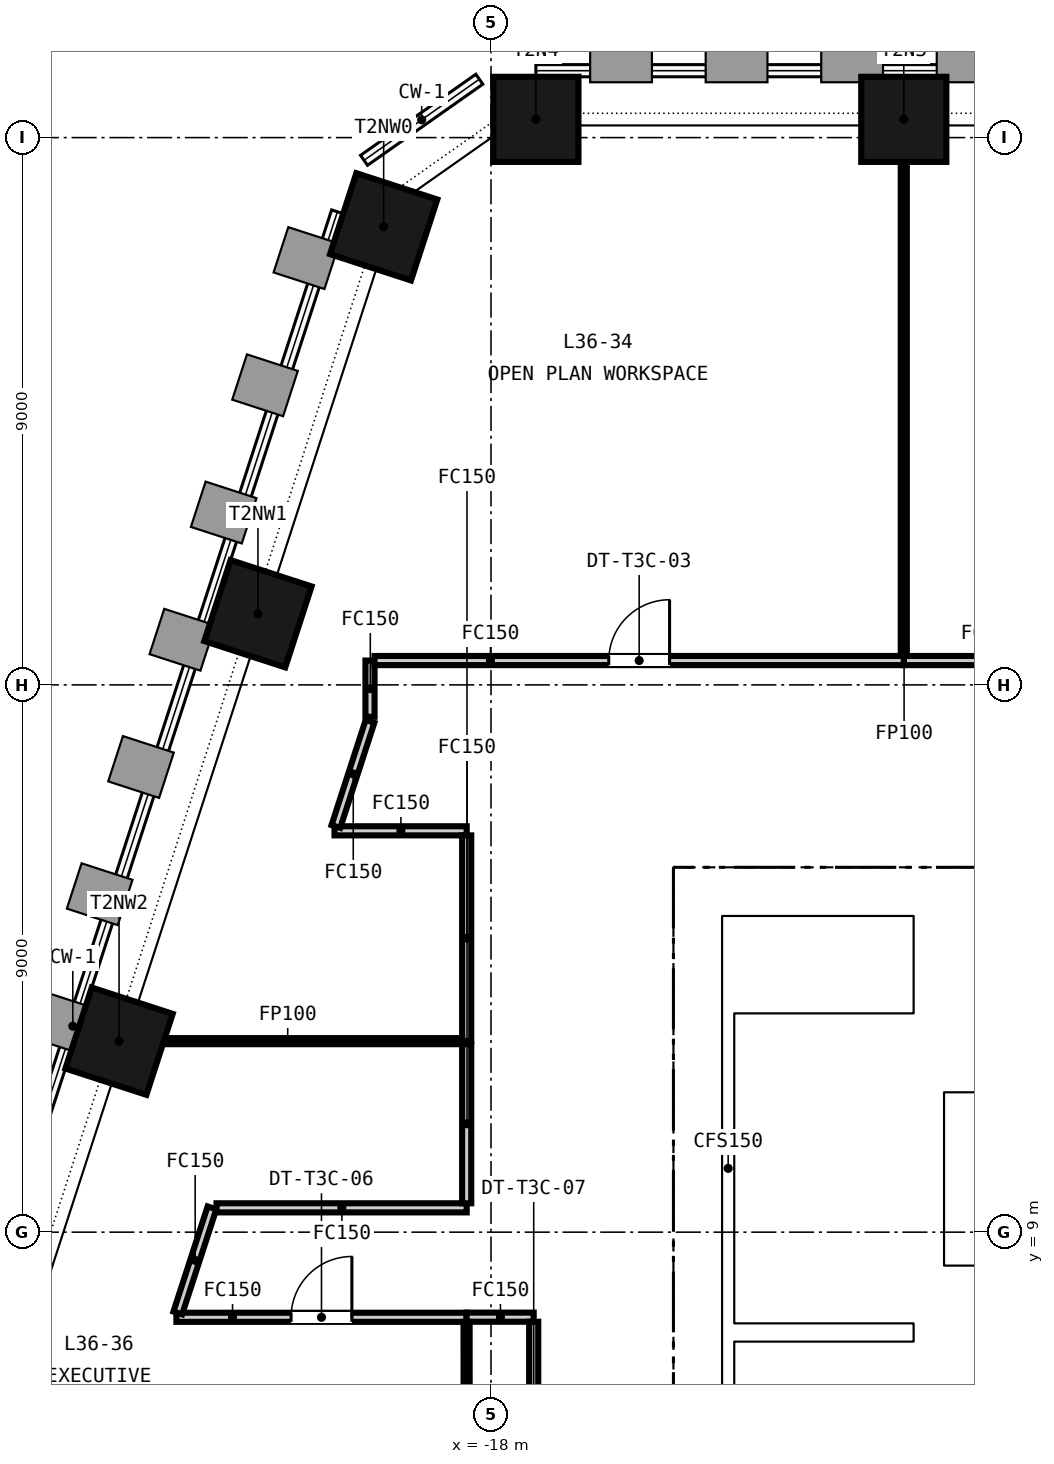
"""IFC4 building model, lengths in metres.
Left out: names, types, materials, properties, quantities, classifications, styles, units other than length and angle.
Written with IfcOpenShell. Run it as: python <this file> out.ifc"""

import sys

from ifc_helpers import new_model, si_unit, direction, frame, frame_2d, origin, origin_2d, place, context, subcontext, project, spatial, rectangle, extrude, element, fill, save


model = new_model("IFC4")
c1 = context("Model", 3, precision=1e-05, world=origin(), true_north=direction((0.0, 1.0)))
c2 = subcontext(c1, "Body", "Model", "MODEL_VIEW")
j1 = project(units=[si_unit("LENGTHUNIT", "METRE"), si_unit("PLANEANGLEUNIT", "RADIAN")], contexts=[c1])
p1 = place(None, origin())
s1 = spatial("IfcSite", under=j1, at=p1, CompositionType="ELEMENT")
p2 = place(p1, origin())
s2 = spatial("IfcBuilding", under=s1, at=p2, CompositionType="ELEMENT")
p3 = place(p2, frame((0.0, 0.0, 148.05)))
s3 = spatial("IfcBuildingStorey", under=s2, at=p3, CompositionType="ELEMENT", Elevation=148.05)
p4 = place(p3, frame((-15.0, 14.6, -0.15), z_axis=(0.0, 0.0, 1.0), x_axis=(1.0, 0.0, 0.0)))
e1 = element("IfcWall", 1, at=p4, inside=s3, PredefinedType="SOLIDWALL", context=c2, shape_type="SweptSolid", body=[
    extrude(rectangle(XDim=30.0, YDim=0.8, at=frame_2d((15.0, 0.0))), origin(), (0.0, 0.0, 1.0), 3.65),
])
p5 = place(p4, frame((9.25, 0.0, 0.15)))
e2 = element("IfcOpeningElement", 2, at=p5, cuts=e1, PredefinedType="OPENING", context=c2, shape_type="SweptSolid", body=[
    extrude(rectangle(XDim=1.5, YDim=2.1, at=frame_2d((0.75, 1.05))), frame((0.0, 0.41, 0.0), z_axis=(0.0, -1.0, 0.0), x_axis=(1.0, 0.0, 0.0)), (0.0, 0.0, 1.0), 0.82),
])
p6 = place(p4, frame((19.4, 0.0, 0.15)))
e3 = element("IfcOpeningElement", 3, at=p6, cuts=e1, PredefinedType="OPENING", context=c2, shape_type="SweptSolid", body=[
    extrude(rectangle(XDim=1.5, YDim=2.1, at=frame_2d((0.75, 1.05))), frame((0.0, 0.41, 0.0), z_axis=(0.0, -1.0, 0.0), x_axis=(1.0, 0.0, 0.0)), (0.0, 0.0, 1.0), 0.82),
])
p7 = place(p4, frame((1.5, 0.0, 0.15)))
e4 = element("IfcOpeningElement", 4, at=p7, cuts=e1, PredefinedType="OPENING", context=c2, shape_type="SweptSolid", body=[
    extrude(rectangle(XDim=1.2, YDim=2.1, at=frame_2d((0.6, 1.05))), frame((0.0, 0.41, 0.0), z_axis=(0.0, -1.0, 0.0), x_axis=(1.0, 0.0, 0.0)), (0.0, 0.0, 1.0), 0.82),
])
p8 = place(p4, frame((27.3, 0.0, 0.15)))
e5 = element("IfcOpeningElement", 5, at=p8, cuts=e1, PredefinedType="OPENING", context=c2, shape_type="SweptSolid", body=[
    extrude(rectangle(XDim=1.2, YDim=2.1, at=frame_2d((0.6, 1.05))), frame((0.0, 0.41, 0.0), z_axis=(0.0, -1.0, 0.0), x_axis=(1.0, 0.0, 0.0)), (0.0, 0.0, 1.0), 0.82),
])
p9 = place(p3, frame((-14.6, 0.8, -0.15), z_axis=(0.0, 0.0, 1.0), x_axis=(0.0, 1.0, 0.0)))
e6 = element("IfcWall", 6, at=p9, inside=s3, PredefinedType="SOLIDWALL", context=c2, shape_type="SweptSolid", body=[
    extrude(rectangle(XDim=13.4, YDim=0.8, at=frame_2d((6.7, 0.0))), origin(), (0.0, 0.0, 1.0), 3.65),
])
p10 = place(p3, frame((-10.8, 0.8, -0.15), z_axis=(0.0, 0.0, 1.0), x_axis=(0.0, 1.0, 0.0)))
e7 = element("IfcWall", 7, at=p10, inside=s3, PredefinedType="SOLIDWALL", context=c2, shape_type="SweptSolid", body=[
    extrude(rectangle(XDim=13.4, YDim=0.5, at=frame_2d((6.7, 0.0))), origin(), (0.0, 0.0, 1.0), 3.65),
])
for number, where, z_axis, x_axis in (
    (8, (-11.212, 27.3, -0.15), (0.0, 0.0, 1.0), (-1.0, 0.0, 0.0)),
    (9, (-17.262, 27.3, -0.15), (0.0, 0.0, 1.0), (-1.0, 0.0, 0.0)),
    (10, (-19.765, 25.533, -0.15), (0.0, 0.0, 1.0), (-0.309, -0.951, 0.0)),
    (11, (-21.833, 19.17, -0.15), (0.0, 0.0, 1.0), (-0.309, -0.951, 0.0)),
    (12, (-24.117, 12.141, -0.15), (0.0, 0.0, 1.0), (-0.309, -0.951, 0.0)),
):
    element("IfcColumn", number, at=place(p3, frame(where, z_axis=z_axis, x_axis=x_axis)), inside=s3, PredefinedType="COLUMN", context=c2, shape_type="SweptSolid", body=[
        extrude(rectangle(XDim=1.4, YDim=1.4, at=origin_2d()), origin(), (0.0, 0.0, 1.0), 3.65),
    ])
p11 = place(p3, frame((-10.55, 8.55, 0.0), z_axis=(0.0, 0.0, 1.0), x_axis=(1.0, 0.0, 0.0)))
e13 = element("IfcWall", 13, at=p11, inside=s3, PredefinedType="PARTITIONING", context=c2, shape_type="SweptSolid", body=[
    extrude(rectangle(XDim=21.1, YDim=0.2, at=frame_2d((10.55, 0.0))), origin(), (0.0, 0.0, 1.0), 3.5),
])
p12 = place(p11, frame((0.675, 0.0, 0.0)))
e14 = element("IfcOpeningElement", 14, at=p12, cuts=e13, PredefinedType="OPENING", context=c2, shape_type="SweptSolid", body=[
    extrude(rectangle(XDim=1.2, YDim=2.1, at=frame_2d((0.6, 1.05))), frame((0.0, 0.11, 0.0), z_axis=(0.0, -1.0, 0.0), x_axis=(1.0, 0.0, 0.0)), (0.0, 0.0, 1.0), 0.22),
])
p13 = place(p11, frame((3.475, 0.0, 0.0)))
e15 = element("IfcOpeningElement", 15, at=p13, cuts=e13, PredefinedType="OPENING", context=c2, shape_type="SweptSolid", body=[
    extrude(rectangle(XDim=1.2, YDim=2.1, at=frame_2d((0.6, 1.05))), frame((0.0, 0.11, 0.0), z_axis=(0.0, -1.0, 0.0), x_axis=(1.0, 0.0, 0.0)), (0.0, 0.0, 1.0), 0.22),
])
p14 = place(p11, frame((6.275, 0.0, 0.0)))
e16 = element("IfcOpeningElement", 16, at=p14, cuts=e13, PredefinedType="OPENING", context=c2, shape_type="SweptSolid", body=[
    extrude(rectangle(XDim=1.2, YDim=2.1, at=frame_2d((0.6, 1.05))), frame((0.0, 0.11, 0.0), z_axis=(0.0, -1.0, 0.0), x_axis=(1.0, 0.0, 0.0)), (0.0, 0.0, 1.0), 0.22),
])
p15 = place(p11, frame((9.075, 0.0, 0.0)))
e17 = element("IfcOpeningElement", 17, at=p15, cuts=e13, PredefinedType="OPENING", context=c2, shape_type="SweptSolid", body=[
    extrude(rectangle(XDim=1.2, YDim=2.1, at=frame_2d((0.6, 1.05))), frame((0.0, 0.11, 0.0), z_axis=(0.0, -1.0, 0.0), x_axis=(1.0, 0.0, 0.0)), (0.0, 0.0, 1.0), 0.22),
])
p16 = place(p11, frame((11.875, 0.0, 0.0)))
e18 = element("IfcOpeningElement", 18, at=p16, cuts=e13, PredefinedType="OPENING", context=c2, shape_type="SweptSolid", body=[
    extrude(rectangle(XDim=1.2, YDim=2.1, at=frame_2d((0.6, 1.05))), frame((0.0, 0.11, 0.0), z_axis=(0.0, -1.0, 0.0), x_axis=(1.0, 0.0, 0.0)), (0.0, 0.0, 1.0), 0.22),
])
p17 = place(p11, frame((14.675, 0.0, 0.0)))
e19 = element("IfcOpeningElement", 19, at=p17, cuts=e13, PredefinedType="OPENING", context=c2, shape_type="SweptSolid", body=[
    extrude(rectangle(XDim=1.2, YDim=2.1, at=frame_2d((0.6, 1.05))), frame((0.0, 0.11, 0.0), z_axis=(0.0, -1.0, 0.0), x_axis=(1.0, 0.0, 0.0)), (0.0, 0.0, 1.0), 0.22),
])
p18 = place(p11, frame((17.475, 0.0, 0.0)))
e20 = element("IfcOpeningElement", 20, at=p18, cuts=e13, PredefinedType="OPENING", context=c2, shape_type="SweptSolid", body=[
    extrude(rectangle(XDim=1.2, YDim=2.1, at=frame_2d((0.6, 1.05))), frame((0.0, 0.11, 0.0), z_axis=(0.0, -1.0, 0.0), x_axis=(1.0, 0.0, 0.0)), (0.0, 0.0, 1.0), 0.22),
])
p19 = place(p11, frame((19.9, 0.0, 0.0)))
e21 = element("IfcOpeningElement", 21, at=p19, cuts=e13, PredefinedType="OPENING", context=c2, shape_type="SweptSolid", body=[
    extrude(rectangle(XDim=0.9, YDim=2.1, at=frame_2d((0.45, 1.05))), frame((0.0, 0.11, 0.0), z_axis=(0.0, -1.0, 0.0), x_axis=(1.0, 0.0, 0.0)), (0.0, 0.0, 1.0), 0.22),
])
p20 = place(p3, frame((-10.55, 11.2, 0.0), z_axis=(0.0, 0.0, 1.0), x_axis=(1.0, 0.0, 0.0)))
e22 = element("IfcWall", 22, at=p20, inside=s3, PredefinedType="PARTITIONING", context=c2, shape_type="SweptSolid", body=[
    extrude(rectangle(XDim=4.8, YDim=0.2, at=frame_2d((2.4, 0.0))), origin(), (0.0, 0.0, 1.0), 3.5),
])
p21 = place(p20, frame((0.525, 0.0, 0.0)))
e23 = element("IfcOpeningElement", 23, at=p21, cuts=e22, PredefinedType="OPENING", context=c2, shape_type="SweptSolid", body=[
    extrude(rectangle(XDim=1.1, YDim=2.1, at=frame_2d((0.55, 1.05))), frame((0.0, 0.11, 0.0), z_axis=(0.0, -1.0, 0.0), x_axis=(1.0, 0.0, 0.0)), (0.0, 0.0, 1.0), 0.22),
])
p22 = place(p20, frame((2.925, 0.0, 0.0)))
e24 = element("IfcOpeningElement", 24, at=p22, cuts=e22, PredefinedType="OPENING", context=c2, shape_type="SweptSolid", body=[
    extrude(rectangle(XDim=1.1, YDim=2.1, at=frame_2d((0.55, 1.05))), frame((0.0, 0.11, 0.0), z_axis=(0.0, -1.0, 0.0), x_axis=(1.0, 0.0, 0.0)), (0.0, 0.0, 1.0), 0.22),
])
p23 = place(p3, frame((-14.0, 7.35, 0.0), z_axis=(0.0, 0.0, 1.0), x_axis=(1.0, 0.0, 0.0)))
e25 = element("IfcWall", 25, at=p23, inside=s3, PredefinedType="SOLIDWALL", context=c2, shape_type="SweptSolid", body=[
    extrude(rectangle(XDim=2.95, YDim=0.3, at=frame_2d((1.475, 0.0))), origin(), (0.0, 0.0, 1.0), 3.5),
])
p24 = place(p3, frame((-14.1, 0.8, 0.0), z_axis=(0.0, 0.0, 1.0), x_axis=(0.0, 1.0, 0.0)))
e26 = element("IfcWall", 26, at=p24, inside=s3, PredefinedType="SOLIDWALL", context=c2, shape_type="SweptSolid", body=[
    extrude(rectangle(XDim=13.4, YDim=0.2, at=frame_2d((6.7, 0.0))), origin(), (0.0, 0.0, 1.0), 3.5),
])
p25 = place(p3, frame((-18.4, 15.6, 0.0), z_axis=(0.0, 0.0, 1.0), x_axis=(-1.0, 0.0, 0.0)))
e27 = element("IfcWall", 27, at=p25, inside=s3, PredefinedType="PARTITIONING", context=c2, shape_type="SweptSolid", body=[
    extrude(rectangle(XDim=2.174, YDim=0.15, at=frame_2d((1.087, 0.0))), origin(), (0.0, 0.0, 1.0), 2.741),
])
p26 = place(p3, frame((-23.174, 7.6, 0.0), z_axis=(0.0, 0.0, 1.0), x_axis=(1.0, 0.0, 0.0)))
e28 = element("IfcWall", 28, at=p26, inside=s3, PredefinedType="PARTITIONING", context=c2, shape_type="SweptSolid", body=[
    extrude(rectangle(XDim=4.772, YDim=0.15, at=frame_2d((2.386, 0.0))), origin(), (0.0, 0.0, 1.0), 2.741),
])
p27 = place(p26, frame((1.886, 0.0, 0.0)))
e29 = element("IfcOpeningElement", 29, at=p27, cuts=e28, PredefinedType="OPENING", context=c2, shape_type="SweptSolid", body=[
    extrude(rectangle(XDim=1.0, YDim=2.1, at=frame_2d((0.5, 1.05))), frame((0.0, 0.085, 0.0), z_axis=(0.0, -1.0, 0.0), x_axis=(1.0, 0.0, 0.0)), (0.0, 0.0, 1.0), 0.17),
])
p28 = place(p3, frame((-17.298, 7.602, 0.0), z_axis=(0.0, 0.0, 1.0), x_axis=(-1.0, 0.0, 0.0)))
e30 = element("IfcWall", 30, at=p28, inside=s3, PredefinedType="PARTITIONING", context=c2, shape_type="SweptSolid", body=[
    extrude(rectangle(XDim=1.104, YDim=0.15, at=frame_2d((0.552, 0.0))), origin(), (0.0, 0.0, 1.0), 2.741),
])
p29 = place(p3, frame((-11.212, 18.4, 0.0), z_axis=(0.0, 0.0, 1.0), x_axis=(1.0, 0.0, 0.0)))
e31 = element("IfcWall", 31, at=p29, inside=s3, PredefinedType="PARTITIONING", context=c2, shape_type="SweptSolid", body=[
    extrude(rectangle(XDim=6.75, YDim=0.15, at=frame_2d((3.375, 0.0))), origin(), (0.0, 0.0, 1.0), 2.741),
])
p30 = place(p29, frame((2.875, 0.0, 0.0)))
e32 = element("IfcOpeningElement", 32, at=p30, cuts=e31, PredefinedType="OPENING", context=c2, shape_type="SweptSolid", body=[
    extrude(rectangle(XDim=1.0, YDim=2.1, at=frame_2d((0.5, 1.05))), frame((0.0, 0.085, 0.0), z_axis=(0.0, -1.0, 0.0), x_axis=(1.0, 0.0, 0.0)), (0.0, 0.0, 1.0), 0.17),
])
p31 = place(p3, frame((-20.551, 15.671, 0.0), z_axis=(0.0, 0.0, 1.0), x_axis=(0.30859997516, 0.951191912987, 0.0)))
e33 = element("IfcWall", 33, at=p31, inside=s3, PredefinedType="PARTITIONING", context=c2, shape_type="SweptSolid", body=[
    extrude(rectangle(XDim=1.817, YDim=0.15, at=frame_2d((0.909, 0.0))), origin(), (0.0, 0.0, 1.0), 2.741),
])
p32 = place(p3, frame((-19.99, 17.475, 0.0), z_axis=(0.0, 0.0, 1.0), x_axis=(0.0, 1.0, 0.0)))
e34 = element("IfcWall", 34, at=p32, inside=s3, PredefinedType="PARTITIONING", context=c2, shape_type="SweptSolid", body=[
    extrude(rectangle(XDim=0.925, YDim=0.15, at=frame_2d((0.462, 0.0))), origin(), (0.0, 0.0, 1.0), 2.741),
])
p33 = place(p3, frame((-19.915, 18.4, 0.0), z_axis=(0.0, 0.0, 1.0), x_axis=(1.0, 0.0, 0.0)))
e35 = element("IfcWall", 35, at=p33, inside=s3, PredefinedType="PARTITIONING", context=c2, shape_type="SweptSolid", body=[
    extrude(rectangle(XDim=8.703, YDim=0.15, at=frame_2d((4.352, 0.0))), origin(), (0.0, 0.0, 1.0), 2.741),
])
p34 = place(p33, frame((3.852, 0.0, 0.0)))
e36 = element("IfcOpeningElement", 36, at=p34, cuts=e35, PredefinedType="OPENING", context=c2, shape_type="SweptSolid", body=[
    extrude(rectangle(XDim=1.0, YDim=2.1, at=frame_2d((0.5, 1.05))), frame((0.0, 0.085, 0.0), z_axis=(0.0, -1.0, 0.0), x_axis=(1.0, 0.0, 0.0)), (0.0, 0.0, 1.0), 0.17),
])
p35 = place(p3, frame((-18.4, 12.141, 0.0), z_axis=(0.0, 0.0, 1.0), x_axis=(0.0, 1.0, 0.0)))
e37 = element("IfcWall", 37, at=p35, inside=s3, PredefinedType="PARTITIONING", context=c2, shape_type="SweptSolid", body=[
    extrude(rectangle(XDim=3.384, YDim=0.15, at=frame_2d((1.692, 0.0))), origin(), (0.0, 0.0, 1.0), 2.741),
])
p36 = place(p3, frame((-11.212, 18.475, 0.0), z_axis=(0.0, 0.0, 1.0), x_axis=(0.0, 1.0, 0.0)))
e38 = element("IfcWall", 38, at=p36, inside=s3, PredefinedType="PARTITIONING", context=c2, shape_type="SweptSolid", body=[
    extrude(rectangle(XDim=8.925, YDim=0.1, at=frame_2d((4.462, 0.0))), origin(), (0.0, 0.0, 1.0), 2.741),
])
p37 = place(p3, frame((-24.222, 12.141, 0.0), z_axis=(0.0, 0.0, 1.0), x_axis=(1.0, 0.0, 0.0)))
e39 = element("IfcWall", 39, at=p37, inside=s3, PredefinedType="PARTITIONING", context=c2, shape_type="SweptSolid", body=[
    extrude(rectangle(XDim=5.747, YDim=0.1, at=frame_2d((2.874, 0.0))), origin(), (0.0, 0.0, 1.0), 2.741),
])
p38 = place(p3, frame((-23.151, 7.671, 0.0), z_axis=(0.0, 0.0, 1.0), x_axis=(0.309086072338, 0.951034068731, 0.0)))
e40 = element("IfcWall", 40, at=p38, inside=s3, PredefinedType="PARTITIONING", context=c2, shape_type="SweptSolid", body=[
    extrude(rectangle(XDim=1.818, YDim=0.15, at=frame_2d((0.909, 0.0))), origin(), (0.0, 0.0, 1.0), 2.741),
])
p39 = place(p3, frame((-22.514, 9.4, 0.0), z_axis=(0.0, 0.0, 1.0), x_axis=(1.0, 0.0, 0.0)))
e41 = element("IfcWall", 41, at=p39, inside=s3, PredefinedType="PARTITIONING", context=c2, shape_type="SweptSolid", body=[
    extrude(rectangle(XDim=4.114, YDim=0.15, at=frame_2d((2.057, 0.0))), origin(), (0.0, 0.0, 1.0), 2.741),
])
p40 = place(p3, frame((-18.4, 9.475, 0.0), z_axis=(0.0, 0.0, 1.0), x_axis=(0.0, 1.0, 0.0)))
e42 = element("IfcWall", 42, at=p40, inside=s3, PredefinedType="PARTITIONING", context=c2, shape_type="SweptSolid", body=[
    extrude(rectangle(XDim=2.616, YDim=0.15, at=frame_2d((1.308, 0.0))), origin(), (0.0, 0.0, 1.0), 2.741),
])
p41 = place(p3, frame((-17.298, -3.602, 0.0), z_axis=(0.0, 0.0, 1.0), x_axis=(0.0, 1.0, 0.0)))
e43 = element("IfcWall", 43, at=p41, inside=s3, PredefinedType="PARTITIONING", context=c2, shape_type="SweptSolid", body=[
    extrude(rectangle(XDim=11.129, YDim=0.15, at=frame_2d((5.564, 0.0))), origin(), (0.0, 0.0, 1.0), 2.741),
])
p42 = place(p41, frame((4.665, 0.0, 0.0)))
e44 = element("IfcOpeningElement", 44, at=p42, cuts=e43, PredefinedType="OPENING", context=c2, shape_type="SweptSolid", body=[
    extrude(rectangle(XDim=1.8, YDim=2.1, at=frame_2d((0.9, 1.05))), frame((0.0, 0.085, 0.0), z_axis=(0.0, -1.0, 0.0), x_axis=(1.0, 0.0, 0.0)), (0.0, 0.0, 1.0), 0.17),
])
p43 = place(p3, frame((-18.402, 7.525, 0.0), z_axis=(0.0, 0.0, 1.0), x_axis=(0.000826189948, -0.999999658705, 0.0)))
e45 = element("IfcWall", 45, at=p43, inside=s3, PredefinedType="PARTITIONING", context=c2, shape_type="SweptSolid", body=[
    extrude(rectangle(XDim=2.364, YDim=0.1, at=frame_2d((1.182, 0.0))), origin(), (0.0, 0.0, 1.0), 2.741),
])
p44 = place(p7, origin())
e46 = element("IfcDoor", 46, at=p44, inside=s3, OperationType="SINGLE_SWING_RIGHT", PredefinedType="DOOR", context=c2, shape_type="SweptSolid", body=[
    extrude(rectangle(XDim=1.2, YDim=2.1, at=frame_2d((0.6, 1.05))), frame((0.0, 0.025, 0.0), z_axis=(0.0, -1.0, 0.0), x_axis=(1.0, 0.0, 0.0)), (0.0, 0.0, 1.0), 0.05),
])
fill(e4, e46)
p45 = place(p34, origin())
e47 = element("IfcDoor", 47, at=p45, inside=s3, OperationType="SINGLE_SWING_RIGHT", PredefinedType="DOOR", context=c2, shape_type="SweptSolid", body=[
    extrude(rectangle(XDim=1.0, YDim=2.1, at=frame_2d((0.5, 1.05))), frame((0.0, 0.025, 0.0), z_axis=(0.0, -1.0, 0.0), x_axis=(1.0, 0.0, 0.0)), (0.0, 0.0, 1.0), 0.05),
])
fill(e36, e47)
p46 = place(p27, origin())
e48 = element("IfcDoor", 48, at=p46, inside=s3, OperationType="SINGLE_SWING_RIGHT", PredefinedType="DOOR", context=c2, shape_type="SweptSolid", body=[
    extrude(rectangle(XDim=1.0, YDim=2.1, at=frame_2d((0.5, 1.05))), frame((0.0, 0.025, 0.0), z_axis=(0.0, -1.0, 0.0), x_axis=(1.0, 0.0, 0.0)), (0.0, 0.0, 1.0), 0.05),
])
fill(e29, e48)
save(model, sys.argv[1])
